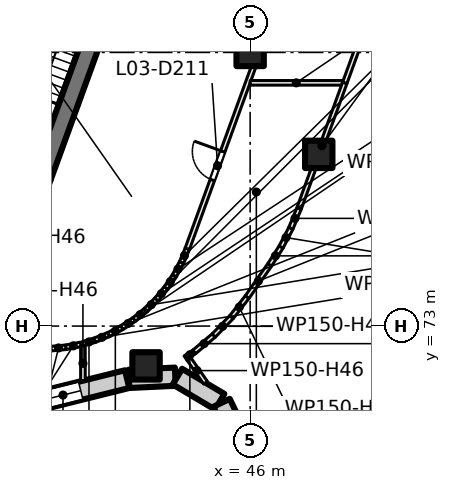
"""IFC4 building model, lengths in metres.
Left out: names, types, materials, properties, quantities, classifications, styles, units other than length and angle.
Written with IfcOpenShell. Run it as: python <this file> out.ifc"""

import sys

from ifc_helpers import new_model, si_unit, direction, frame, frame_2d, origin, origin_2d, place, context, subcontext, project, spatial, rectangle, extrude, element, fill, save


model = new_model("IFC4")
c1 = context("Model", 3, precision=1e-05, world=origin(), true_north=direction((0.0, 1.0)))
c2 = subcontext(c1, "Body", "Model", "MODEL_VIEW")
j1 = project(units=[si_unit("LENGTHUNIT", "METRE"), si_unit("PLANEANGLEUNIT", "RADIAN")], contexts=[c1])
p1 = place(None, origin())
s1 = spatial("IfcSite", under=j1, at=p1, CompositionType="ELEMENT")
p2 = place(p1, origin())
s2 = spatial("IfcBuilding", under=s1, at=p2, CompositionType="ELEMENT")
p3 = place(p2, frame((0.0, 0.0, 17.5)))
s3 = spatial("IfcBuildingStorey", under=s2, at=p3, CompositionType="ELEMENT", Elevation=17.5)
for number, where, z_axis, x_axis in (
    (1, (46.0, 82.0, 0.0), (0.0, 0.0, 1.0), (1.0, 0.0, 0.0)),
    (2, (42.576, 71.691, 0.0), (0.0, 0.0, 1.0), (1.0, 0.0, 0.0)),
    (3, (48.257, 78.648, 0.0), (0.0, 0.0, 1.0), (1.0, 0.0, 0.0)),
):
    element("IfcColumn", number, at=place(p3, frame(where, z_axis=z_axis, x_axis=x_axis)), inside=s3, PredefinedType="COLUMN", context=c2, shape_type="SweptSolid", body=[
        extrude(rectangle(XDim=0.9, YDim=0.9, at=origin_2d()), origin(), (0.0, 0.0, 1.0), 5.0),
    ])
p4 = place(p3, frame((39.159, 77.92, 0.0), z_axis=(0.0, 0.0, 1.0), x_axis=(0.342016982193, 0.939693771338, 0.0)))
e4 = element("IfcWall", 4, at=p4, inside=s3, PredefinedType="SHEAR", context=c2, shape_type="SweptSolid", body=[
    extrude(rectangle(XDim=7.8, YDim=0.6, at=frame_2d((3.9, 0.0))), origin(), (0.0, 0.0, 1.0), 5.0),
])
p5 = place(p3, frame((41.954, 71.255, 0.0), z_axis=(0.0, 0.0, 1.0), x_axis=(-0.970377180078, -0.241594967628, 0.0)))
e5 = element("IfcWall", 5, at=p5, inside=s3, PredefinedType="SOLIDWALL", context=c2, shape_type="SweptSolid", body=[
    extrude(rectangle(XDim=4.031, YDim=0.6, at=frame_2d((2.016, 0.0))), origin(), (0.0, 0.0, 1.0), 4.6),
])
p6 = place(p5, frame((1.574, 0.0, 0.9)))
e6 = element("IfcOpeningElement", 6, at=p6, cuts=e5, PredefinedType="OPENING", context=c2, shape_type="SweptSolid", body=[
    extrude(rectangle(XDim=1.2, YDim=3.0, at=frame_2d((0.6, 1.5))), frame((0.0, 0.31, 0.0), z_axis=(0.0, -1.0, 0.0), x_axis=(1.0, 0.0, 0.0)), (0.0, 0.0, 1.0), 0.62),
])
p7 = place(p3, frame((43.538, 71.335, 0.0), z_axis=(0.0, 0.0, 1.0), x_axis=(-0.998910056035, -0.046676546065, 0.0)))
e7 = element("IfcWall", 7, at=p7, inside=s3, PredefinedType="SOLIDWALL", context=c2, shape_type="SweptSolid", body=[
    extrude(rectangle(XDim=1.527, YDim=0.6, at=frame_2d((0.764, 0.0))), origin(), (0.0, 0.0, 1.0), 4.6),
])
p8 = place(p3, frame((44.998, 70.511, 0.0), z_axis=(0.0, 0.0, 1.0), x_axis=(-0.859405023985, 0.511295418275, 0.0)))
e8 = element("IfcWall", 8, at=p8, inside=s3, PredefinedType="SOLIDWALL", context=c2, shape_type="SweptSolid", body=[
    extrude(rectangle(XDim=1.617, YDim=0.6, at=frame_2d((0.809, 0.0))), origin(), (0.0, 0.0, 1.0), 4.6),
])
p9 = place(p3, frame((45.689, 69.173, 0.0), z_axis=(0.0, 0.0, 1.0), x_axis=(-0.435706421579, 0.900088836835, 0.0)))
e9 = element("IfcWall", 9, at=p9, inside=s3, PredefinedType="SOLIDWALL", context=c2, shape_type="SweptSolid", body=[
    extrude(rectangle(XDim=1.447, YDim=0.6, at=frame_2d((0.724, 0.0))), origin(), (0.0, 0.0, 1.0), 4.6),
])
p10 = place(p3, frame((39.45, 72.258, 0.0), z_axis=(0.0, 0.0, 1.0), x_axis=(0.995925282781, 0.090182210646, 0.0)))
e10 = element("IfcWall", 10, at=p10, inside=s3, PredefinedType="PARTITIONING", context=c2, shape_type="SweptSolid", body=[
    extrude(rectangle(XDim=0.498, YDim=0.15, at=frame_2d((0.249, 0.0))), origin(), (0.0, 0.0, 1.0), 4.6),
])
p11 = place(p3, frame((39.938, 72.302, 0.0), z_axis=(0.0, 0.0, 1.0), x_axis=(0.981729772821, 0.190280459207, 0.0)))
e11 = element("IfcWall", 11, at=p11, inside=s3, PredefinedType="PARTITIONING", context=c2, shape_type="SweptSolid", body=[
    extrude(rectangle(XDim=0.499, YDim=0.15, at=frame_2d((0.25, 0.0))), origin(), (0.0, 0.0, 1.0), 4.6),
])
p12 = place(p3, frame((40.5, 71.203, 0.0), z_axis=(0.0, 0.0, 1.0), x_axis=(0.0, 1.0, 0.0)))
e12 = element("IfcWall", 12, at=p12, inside=s3, PredefinedType="PARTITIONING", context=c2, shape_type="SweptSolid", body=[
    extrude(rectangle(XDim=1.138, YDim=0.15, at=frame_2d((0.569, 0.0))), origin(), (0.0, 0.0, 1.0), 4.6),
])
p13 = place(p3, frame((40.5, 72.419, 0.0), z_axis=(0.0, 0.0, 1.0), x_axis=(0.958631822216, 0.284648958253, 0.0)))
e13 = element("IfcWall", 13, at=p13, inside=s3, PredefinedType="PARTITIONING", context=c2, shape_type="SweptSolid", body=[
    extrude(rectangle(XDim=0.415, YDim=0.15, at=frame_2d((0.208, 0.0))), origin(), (0.0, 0.0, 1.0), 4.6),
])
for number, where, z_axis, x_axis in (
    (14, (40.891, 72.535, 0.0), (0.0, 0.0, 1.0), (0.926, 0.378, 0.0)),
    (15, (41.346, 72.72, 0.0), (0.0, 0.0, 1.0), (0.884, 0.468, 0.0)),
):
    element("IfcWall", number, at=place(p3, frame(where, z_axis=z_axis, x_axis=x_axis)), inside=s3, PredefinedType="PARTITIONING", context=c2, shape_type="SweptSolid", body=[
        extrude(rectangle(XDim=0.498, YDim=0.15, at=frame_2d((0.249, 0.0))), origin(), (0.0, 0.0, 1.0), 4.6),
    ])
p14 = place(p3, frame((41.78, 72.949, 0.0), z_axis=(0.0, 0.0, 1.0), x_axis=(0.834609406562, 0.550842208331, 0.0)))
e16 = element("IfcWall", 16, at=p14, inside=s3, PredefinedType="PARTITIONING", context=c2, shape_type="SweptSolid", body=[
    extrude(rectangle(XDim=0.497, YDim=0.15, at=frame_2d((0.249, 0.0))), origin(), (0.0, 0.0, 1.0), 4.6),
])
p15 = place(p3, frame((42.189, 73.219, 0.0), z_axis=(0.0, 0.0, 1.0), x_axis=(0.777507544785, 0.628873610356, 0.0)))
e17 = element("IfcWall", 17, at=p15, inside=s3, PredefinedType="PARTITIONING", context=c2, shape_type="SweptSolid", body=[
    extrude(rectangle(XDim=0.498, YDim=0.15, at=frame_2d((0.249, 0.0))), origin(), (0.0, 0.0, 1.0), 4.6),
])
p16 = place(p3, frame((42.57, 73.527, 0.0), z_axis=(0.0, 0.0, 1.0), x_axis=(0.711252497293, 0.702936615275, 0.0)))
e18 = element("IfcWall", 18, at=p16, inside=s3, PredefinedType="PARTITIONING", context=c2, shape_type="SweptSolid", body=[
    extrude(rectangle(XDim=0.499, YDim=0.15, at=frame_2d((0.25, 0.0))), origin(), (0.0, 0.0, 1.0), 4.6),
])
p17 = place(p3, frame((42.92, 73.872, 0.0), z_axis=(0.0, 0.0, 1.0), x_axis=(0.636754760492, 0.771066388186, 0.0)))
e19 = element("IfcWall", 19, at=p17, inside=s3, PredefinedType="PARTITIONING", context=c2, shape_type="SweptSolid", body=[
    extrude(rectangle(XDim=0.498, YDim=0.15, at=frame_2d((0.249, 0.0))), origin(), (0.0, 0.0, 1.0), 4.6),
])
p18 = place(p3, frame((43.233, 74.25, 0.0), z_axis=(0.0, 0.0, 1.0), x_axis=(0.560685437924, 0.828028888203, 0.0)))
e20 = element("IfcWall", 20, at=p18, inside=s3, PredefinedType="PARTITIONING", context=c2, shape_type="SweptSolid", body=[
    extrude(rectangle(XDim=0.498, YDim=0.15, at=frame_2d((0.249, 0.0))), origin(), (0.0, 0.0, 1.0), 4.6),
])
p19 = place(p3, frame((43.508, 74.656, 0.0), z_axis=(0.0, 0.0, 1.0), x_axis=(0.47751332042, 0.878624509573, 0.0)))
e21 = element("IfcWall", 21, at=p19, inside=s3, PredefinedType="PARTITIONING", context=c2, shape_type="SweptSolid", body=[
    extrude(rectangle(XDim=0.499, YDim=0.15, at=frame_2d((0.249, 0.0))), origin(), (0.0, 0.0, 1.0), 4.6),
])
p20 = place(p3, frame((43.743, 75.088, 0.0), z_axis=(0.0, 0.0, 1.0), x_axis=(0.387550596891, 0.921848433773, 0.0)))
e22 = element("IfcWall", 22, at=p20, inside=s3, PredefinedType="PARTITIONING", context=c2, shape_type="SweptSolid", body=[
    extrude(rectangle(XDim=0.496, YDim=0.15, at=frame_2d((0.248, 0.0))), origin(), (0.0, 0.0, 1.0), 4.6),
])
p21 = place(p3, frame((43.869, 71.955, 0.0), z_axis=(0.0, 0.0, 1.0), x_axis=(0.829630253938, 0.558313211155, 0.0)))
e23 = element("IfcWall", 23, at=p21, inside=s3, PredefinedType="PARTITIONING", context=c2, shape_type="SweptSolid", body=[
    extrude(rectangle(XDim=0.358, YDim=0.15, at=frame_2d((0.179, 0.0))), origin(), (0.0, 0.0, 1.0), 4.6),
])
p22 = place(p3, frame((43.974, 71.936, 0.0), z_axis=(0.0, 0.0, 1.0), x_axis=(0.573311311757, -0.819337622602, 0.0)))
e24 = element("IfcWall", 24, at=p22, inside=s3, PredefinedType="PARTITIONING", context=c2, shape_type="SweptSolid", body=[
    extrude(rectangle(XDim=0.977, YDim=0.15, at=frame_2d((0.488, 0.0))), origin(), (0.0, 0.0, 1.0), 4.6),
])
p23 = place(p3, frame((49.749, 91.52, 0.0), z_axis=(0.0, 0.0, 1.0), x_axis=(-0.342022021776, -0.939691937084, 0.0)))
e25 = element("IfcWall", 25, at=p23, inside=s3, PredefinedType="PARTITIONING", context=c2, shape_type="SweptSolid", body=[
    extrude(rectangle(XDim=17.004, YDim=0.15, at=frame_2d((8.502, 0.0))), origin(), (0.0, 0.0, 1.0), 4.6),
])
p24 = place(p23, frame((13.597, 0.0, 0.0)))
e26 = element("IfcOpeningElement", 26, at=p24, cuts=e25, PredefinedType="OPENING", context=c2, shape_type="SweptSolid", body=[
    extrude(rectangle(XDim=1.0, YDim=2.1, at=frame_2d((0.5, 1.05))), frame((0.0, 0.085, 0.0), z_axis=(0.0, -1.0, 0.0), x_axis=(1.0, 0.0, 0.0)), (0.0, 0.0, 1.0), 0.17),
])
p25 = place(p23, frame((5.101, 0.0, 0.0)))
e27 = element("IfcOpeningElement", 27, at=p25, cuts=e25, PredefinedType="OPENING", context=c2, shape_type="SweptSolid", body=[
    extrude(rectangle(XDim=1.0, YDim=2.1, at=frame_2d((0.5, 1.05))), frame((0.0, 0.085, 0.0), z_axis=(0.0, -1.0, 0.0), x_axis=(1.0, 0.0, 0.0)), (0.0, 0.0, 1.0), 0.17),
])
p26 = place(p3, frame((44.16, 72.15, 0.0), z_axis=(0.0, 0.0, 1.0), x_axis=(0.76527802178, 0.643699890773, 0.0)))
e28 = element("IfcWall", 28, at=p26, inside=s3, PredefinedType="PARTITIONING", context=c2, shape_type="SweptSolid", body=[
    extrude(rectangle(XDim=0.845, YDim=0.15, at=frame_2d((0.423, 0.0))), origin(), (0.0, 0.0, 1.0), 4.6),
])
p27 = place(p3, frame((44.801, 72.688, 0.0), z_axis=(0.0, 0.0, 1.0), x_axis=(0.69445039199, 0.719540584724, 0.0)))
e29 = element("IfcWall", 29, at=p27, inside=s3, PredefinedType="PARTITIONING", context=c2, shape_type="SweptSolid", body=[
    extrude(rectangle(XDim=0.846, YDim=0.15, at=frame_2d((0.423, 0.0))), origin(), (0.0, 0.0, 1.0), 4.6),
])
p28 = place(p3, frame((45.384, 73.291, 0.0), z_axis=(0.0, 0.0, 1.0), x_axis=(0.615262082459, 0.788322630582, 0.0)))
e30 = element("IfcWall", 30, at=p28, inside=s3, PredefinedType="PARTITIONING", context=c2, shape_type="SweptSolid", body=[
    extrude(rectangle(XDim=0.844, YDim=0.15, at=frame_2d((0.422, 0.0))), origin(), (0.0, 0.0, 1.0), 4.6),
])
p29 = place(p3, frame((45.901, 73.952, 0.0), z_axis=(0.0, 0.0, 1.0), x_axis=(0.573335928465, 0.819320397117, 0.0)))
e31 = element("IfcWall", 31, at=p29, inside=s3, PredefinedType="PARTITIONING", context=c2, shape_type="SweptSolid", body=[
    extrude(rectangle(XDim=1.296, YDim=0.15, at=frame_2d((0.648, 0.0))), origin(), (0.0, 0.0, 1.0), 4.6),
])
p30 = place(p3, frame((46.0, 81.0, 0.0), z_axis=(0.0, 0.0, 1.0), x_axis=(1.0, 0.0, 0.0)))
e32 = element("IfcWall", 32, at=p30, inside=s3, PredefinedType="PARTITIONING", context=c2, shape_type="SweptSolid", body=[
    extrude(rectangle(XDim=3.033, YDim=0.15, at=frame_2d((1.517, 0.0))), origin(), (0.0, 0.0, 1.0), 3.6),
])
p31 = place(p3, frame((46.644, 75.014, 0.0), z_axis=(0.0, 0.0, 1.0), x_axis=(0.537708998539, 0.843130495766, 0.0)))
e33 = element("IfcWall", 33, at=p31, inside=s3, PredefinedType="PARTITIONING", context=c2, shape_type="SweptSolid", body=[
    extrude(rectangle(XDim=0.701, YDim=0.15, at=frame_2d((0.351, 0.0))), origin(), (0.0, 0.0, 1.0), 4.6),
])
p32 = place(p3, frame((47.017, 75.599, 0.0), z_axis=(0.0, 0.0, 1.0), x_axis=(0.462388443715, 0.886677465101, 0.0)))
e34 = element("IfcWall", 34, at=p32, inside=s3, PredefinedType="PARTITIONING", context=c2, shape_type="SweptSolid", body=[
    extrude(rectangle(XDim=0.705, YDim=0.15, at=frame_2d((0.353, 0.0))), origin(), (0.0, 0.0, 1.0), 3.6),
])
p33 = place(p3, frame((47.34, 76.218, 0.0), z_axis=(0.0, 0.0, 1.0), x_axis=(0.381992942343, 0.924165240636, 0.0)))
e35 = element("IfcWall", 35, at=p33, inside=s3, PredefinedType="PARTITIONING", context=c2, shape_type="SweptSolid", body=[
    extrude(rectangle(XDim=0.701, YDim=0.15, at=frame_2d((0.351, 0.0))), origin(), (0.0, 0.0, 1.0), 3.6),
])
p34 = place(p3, frame((47.608, 76.866, 0.0), z_axis=(0.0, 0.0, 1.0), x_axis=(0.342112853329, 0.939658871925, 0.0)))
e36 = element("IfcWall", 36, at=p34, inside=s3, PredefinedType="PARTITIONING", context=c2, shape_type="SweptSolid", body=[
    extrude(rectangle(XDim=4.399, YDim=0.15, at=frame_2d((2.2, 0.0))), origin(), (0.0, 0.0, 1.0), 3.6),
])
p35 = place(p3, frame((49.113, 81.0, 0.0), z_axis=(0.0, 0.0, 1.0), x_axis=(0.341994090833, 0.939702102709, 0.0)))
e37 = element("IfcWall", 37, at=p35, inside=s3, PredefinedType="PARTITIONING", context=c2, shape_type="SweptSolid", body=[
    extrude(rectangle(XDim=14.29, YDim=0.15, at=frame_2d((7.145, 0.0))), origin(), (0.0, 0.0, 1.0), 3.6),
])
p36 = place(p6, origin())
e38 = element("IfcWindow", 38, at=p36, inside=s3, PartitioningType="SINGLE_PANEL", PredefinedType="WINDOW", context=c2, shape_type="SweptSolid", body=[
    extrude(rectangle(XDim=1.2, YDim=3.0, at=frame_2d((0.6, 1.5))), frame((0.0, 0.03, 0.0), z_axis=(0.0, -1.0, 0.0), x_axis=(1.0, 0.0, 0.0)), (0.0, 0.0, 1.0), 0.06),
])
fill(e6, e38)
p37 = place(p24, origin())
e39 = element("IfcDoor", 39, at=p37, inside=s3, OperationType="SINGLE_SWING_LEFT", PredefinedType="DOOR", context=c2, shape_type="SweptSolid", body=[
    extrude(rectangle(XDim=1.0, YDim=2.1, at=frame_2d((0.5, 1.05))), frame((0.0, 0.025, 0.0), z_axis=(0.0, -1.0, 0.0), x_axis=(1.0, 0.0, 0.0)), (0.0, 0.0, 1.0), 0.05),
])
fill(e26, e39)
save(model, sys.argv[1])
